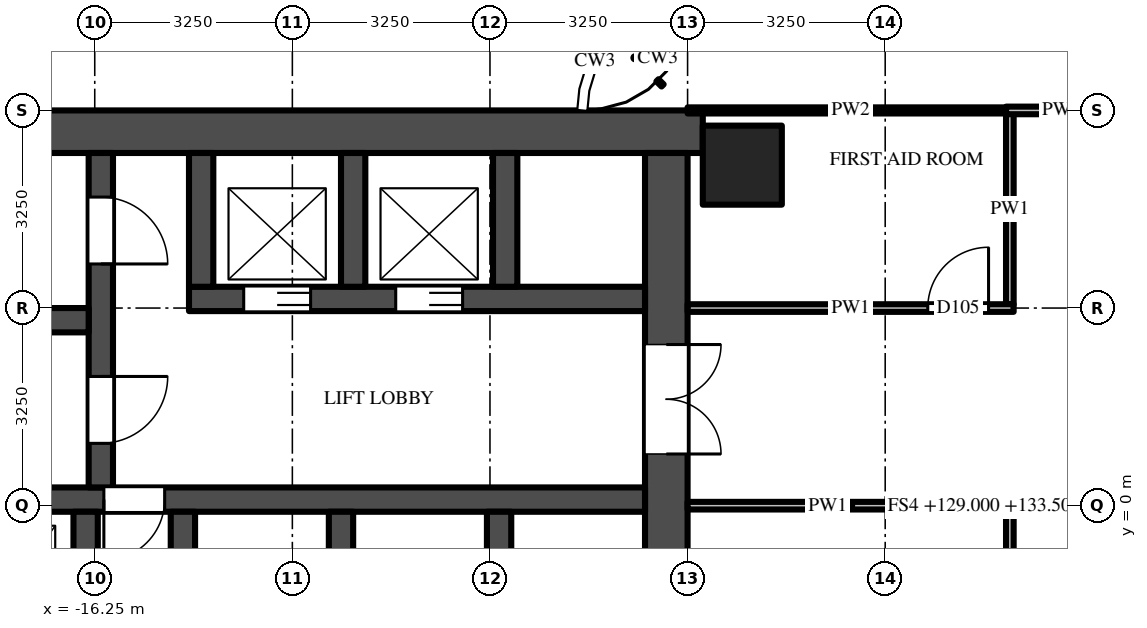
"""IFC4 building model, lengths in metres.
Left out: names, types, materials, properties, quantities, classifications, styles, units other than length and angle.
Written with IfcOpenShell. Run it as: python <this file> out.ifc"""

import sys

from ifc_helpers import new_model, si_unit, direction, frame, frame_2d, origin, origin_2d, place, context, subcontext, project, spatial, rectangle, extrude, source, transform, mapped, element, fill, save


model = new_model("IFC4")
c1 = context("Model", 3, precision=1e-05, world=origin(), true_north=direction((0.0, 1.0)))
c2 = subcontext(c1, "Body", "Model", "MODEL_VIEW")
j1 = project(units=[si_unit("LENGTHUNIT", "METRE"), si_unit("PLANEANGLEUNIT", "RADIAN")], contexts=[c1])
p1 = place(None, origin())
s1 = spatial("IfcSite", under=j1, at=p1, CompositionType="ELEMENT")
p2 = place(p1, origin())
s2 = spatial("IfcBuilding", under=s1, at=p2, CompositionType="ELEMENT")
p3 = place(p2, frame((0.0, 0.0, 129.0)))
s3 = spatial("IfcBuildingStorey", under=s2, at=p3, CompositionType="ELEMENT", Elevation=129.0)
m1 = source(origin(), c2, "Body", "SweptSolid", [
    extrude(rectangle(XDim=1.3, YDim=1.3, at=origin_2d()), origin(), (0.0, 0.0, 1.0), 4.5),
])
p4 = place(p3, frame((-5.6, 5.6, 0.0), z_axis=(0.0, 0.0, 1.0), x_axis=(1.0, 0.0, 0.0)))
e1 = element("IfcColumn", 1, at=p4, inside=s3, PredefinedType="COLUMN", context=c2, shape_type="MappedRepresentation", body=[
    mapped(m1, transform((0.0, 0.0, 0.0))),
])
m2 = source(origin(), c2, "Body", "SweptSolid", [
    extrude(rectangle(XDim=16.5, YDim=0.7, at=frame_2d((8.25, 0.0))), origin(), (0.0, 0.0, 1.0), 4.25),
])
p5 = place(p3, frame((-6.25, 6.15, 0.0), z_axis=(0.0, 0.0, 1.0), x_axis=(-1.0, 0.0, 0.0)))
e2 = element("IfcWall", 2, at=p5, inside=s3, PredefinedType="SHEAR", context=c2, shape_type="MappedRepresentation", body=[
    mapped(m2, transform((0.0, 0.0, 0.0))),
])
m3 = source(origin(), c2, "Body", "SweptSolid", [
    extrude(rectangle(XDim=9.05, YDim=0.7, at=frame_2d((4.525, 0.0))), origin(), (0.0, 0.0, 1.0), 4.25),
])
p6 = place(p3, frame((-6.85, 5.8, 0.0), z_axis=(0.0, 0.0, 1.0), x_axis=(0.0, -1.0, 0.0)))
e3 = element("IfcWall", 3, at=p6, inside=s3, PredefinedType="SHEAR", context=c2, shape_type="MappedRepresentation", body=[
    mapped(m3, transform((0.0, 0.0, 0.0))),
])
m4 = source(origin(), c2, "Body", "SweptSolid", [
    extrude(rectangle(XDim=1.8, YDim=2.1, at=frame_2d((0.9, 1.05))), frame((0.0, 0.36, 0.0), z_axis=(0.0, -1.0, 0.0), x_axis=(1.0, 0.0, 0.0)), (0.0, 0.0, 1.0), 0.72),
])
p7 = place(p6, frame((3.15, 0.0, 0.0)))
e4 = element("IfcOpeningElement", 4, at=p7, cuts=e3, PredefinedType="OPENING", context=c2, shape_type="MappedRepresentation", body=[
    mapped(m4, transform((0.0, 0.0, 0.0))),
])
m5 = source(origin(), c2, "Body", "SweptSolid", [
    extrude(rectangle(XDim=7.5, YDim=0.4, at=frame_2d((3.75, 0.0))), origin(), (0.0, 0.0, 1.0), 4.25),
])
p8 = place(p3, frame((-7.2, 3.4, 0.0), z_axis=(0.0, 0.0, 1.0), x_axis=(-1.0, 0.0, 0.0)))
e5 = element("IfcWall", 5, at=p8, inside=s3, PredefinedType="SHEAR", context=c2, shape_type="MappedRepresentation", body=[
    mapped(m5, transform((0.0, 0.0, 0.0))),
])
m6 = source(origin(), c2, "Body", "SweptSolid", [
    extrude(rectangle(XDim=1.1, YDim=2.1, at=frame_2d((0.55, 1.05))), frame((0.0, 0.21, 0.0), z_axis=(0.0, -1.0, 0.0), x_axis=(1.0, 0.0, 0.0)), (0.0, 0.0, 1.0), 0.42),
])
p9 = place(p8, frame((3.0, 0.0, 0.0)))
e6 = element("IfcOpeningElement", 6, at=p9, cuts=e5, PredefinedType="OPENING", context=c2, shape_type="MappedRepresentation", body=[
    mapped(m6, transform((0.0, 0.0, 0.0))),
])
p10 = place(p8, frame((5.5, 0.0, 0.0)))
e7 = element("IfcOpeningElement", 7, at=p10, cuts=e5, PredefinedType="OPENING", context=c2, shape_type="MappedRepresentation", body=[
    mapped(m6, transform((0.0, 0.0, 0.0))),
])
m7 = source(origin(), c2, "Body", "SweptSolid", [
    extrude(rectangle(XDim=14.85, YDim=0.4, at=frame_2d((7.425, 0.0))), origin(), (0.0, 0.0, 1.0), 4.25),
])
p11 = place(p3, frame((-7.2, 0.1, 0.0), z_axis=(0.0, 0.0, 1.0), x_axis=(-1.0, 0.0, 0.0)))
e8 = element("IfcWall", 8, at=p11, inside=s3, PredefinedType="SHEAR", context=c2, shape_type="MappedRepresentation", body=[
    mapped(m7, transform((0.0, 0.0, 0.0))),
])
m8 = source(origin(), c2, "Body", "SweptSolid", [
    extrude(rectangle(XDim=1.0, YDim=2.1, at=frame_2d((0.5, 1.05))), frame((0.0, 0.21, 0.0), z_axis=(0.0, -1.0, 0.0), x_axis=(1.0, 0.0, 0.0)), (0.0, 0.0, 1.0), 0.42),
])
p12 = place(p11, frame((7.9, 0.0, 0.0)))
e9 = element("IfcOpeningElement", 9, at=p12, cuts=e8, PredefinedType="OPENING", context=c2, shape_type="MappedRepresentation", body=[
    mapped(m8, transform((0.0, 0.0, 0.0))),
])
m9 = source(origin(), c2, "Body", "SweptSolid", [
    extrude(rectangle(XDim=5.5, YDim=0.4, at=frame_2d((2.75, 0.0))), origin(), (0.0, 0.0, 1.0), 4.25),
])
p13 = place(p3, frame((-16.15, 5.8, 0.0), z_axis=(0.0, 0.0, 1.0), x_axis=(0.0, -1.0, 0.0)))
e10 = element("IfcWall", 10, at=p13, inside=s3, PredefinedType="SHEAR", context=c2, shape_type="MappedRepresentation", body=[
    mapped(m9, transform((0.0, 0.0, 0.0))),
])
p14 = place(p13, frame((0.725, 0.0, 0.0)))
e11 = element("IfcOpeningElement", 11, at=p14, cuts=e10, PredefinedType="OPENING", context=c2, shape_type="MappedRepresentation", body=[
    mapped(m6, transform((0.0, 0.0, 0.0))),
])
p15 = place(p13, frame((3.675, 0.0, 0.0)))
e12 = element("IfcOpeningElement", 12, at=p15, cuts=e10, PredefinedType="OPENING", context=c2, shape_type="MappedRepresentation", body=[
    mapped(m6, transform((0.0, 0.0, 0.0))),
])
m10 = source(origin(), c2, "Body", "SweptSolid", [
    extrude(rectangle(XDim=5.7, YDim=0.4, at=frame_2d((2.85, 0.0))), origin(), (0.0, 0.0, 1.0), 4.25),
])
p16 = place(p3, frame((-16.35, 3.05, 0.0), z_axis=(0.0, 0.0, 1.0), x_axis=(-1.0, 0.0, 0.0)))
e13 = element("IfcWall", 13, at=p16, inside=s3, PredefinedType="SHEAR", context=c2, shape_type="MappedRepresentation", body=[
    mapped(m10, transform((0.0, 0.0, 0.0))),
])
m11 = source(origin(), c2, "Body", "SweptSolid", [
    extrude(rectangle(XDim=2.2, YDim=0.4, at=frame_2d((1.1, 0.0))), origin(), (0.0, 0.0, 1.0), 4.25),
])
for number, where, z_axis, x_axis in (
    (14, (-9.5, 5.8, 0.0), (0.0, 0.0, 1.0), (0.0, -1.0, 0.0)),
    (15, (-12.0, 5.8, 0.0), (0.0, 0.0, 1.0), (0.0, -1.0, 0.0)),
    (16, (-14.5, 5.8, 0.0), (0.0, 0.0, 1.0), (0.0, -1.0, 0.0)),
):
    element("IfcWall", number, at=place(p3, frame(where, z_axis=z_axis, x_axis=x_axis)), inside=s3, PredefinedType="SHEAR", context=c2, shape_type="MappedRepresentation", body=[
        mapped(m11, transform((0.0, 0.0, 0.0))),
    ])
m12 = source(origin(), c2, "Body", "SweptSolid", [
    extrude(rectangle(XDim=2.45, YDim=0.4, at=frame_2d((1.225, 0.0))), origin(), (0.0, 0.0, 1.0), 4.25),
])
for number, where, z_axis, x_axis in (
    (17, (-9.6, -0.1, 0.0), (0.0, 0.0, 1.0), (0.0, -1.0, 0.0)),
    (18, (-12.2, -0.1, 0.0), (0.0, 0.0, 1.0), (0.0, -1.0, 0.0)),
    (19, (-14.8, -0.1, 0.0), (0.0, 0.0, 1.0), (0.0, -1.0, 0.0)),
    (20, (-16.4, -0.1, 0.0), (0.0, 0.0, 1.0), (0.0, -1.0, 0.0)),
):
    element("IfcWall", number, at=place(p3, frame(where, z_axis=z_axis, x_axis=x_axis)), inside=s3, PredefinedType="SHEAR", context=c2, shape_type="MappedRepresentation", body=[
        mapped(m12, transform((0.0, 0.0, 0.0))),
    ])
m13 = source(origin(), c2, "Body", "SweptSolid", [
    extrude(rectangle(XDim=3.125, YDim=0.125, at=frame_2d((1.562, 0.0))), origin(), (0.0, 0.0, 1.0), 3.546),
])
p17 = place(p3, frame((-1.2, -0.062, 0.0), z_axis=(0.0, 0.0, 1.0), x_axis=(0.0, -1.0, 0.0)))
e21 = element("IfcWall", 21, at=p17, inside=s3, PredefinedType="PARTITIONING", context=c2, shape_type="MappedRepresentation", body=[
    mapped(m13, transform((0.0, 0.0, 0.0))),
])
m14 = source(origin(), c2, "Body", "SweptSolid", [
    extrude(rectangle(XDim=3.137, YDim=0.125, at=frame_2d((1.569, 0.0))), origin(), (0.0, 0.0, 1.0), 3.468),
])
p18 = place(p3, frame((-1.2, 6.45, 0.0), z_axis=(0.0, 0.0, 1.0), x_axis=(0.0, -1.0, 0.0)))
e22 = element("IfcWall", 22, at=p18, inside=s3, PredefinedType="PARTITIONING", context=c2, shape_type="MappedRepresentation", body=[
    mapped(m14, transform((0.0, 0.0, 0.0))),
])
m15 = source(origin(), c2, "Body", "SweptSolid", [
    extrude(rectangle(XDim=5.363, YDim=0.125, at=frame_2d((2.681, 0.0))), origin(), (0.0, 0.0, 1.0), 3.468),
])
p19 = place(p3, frame((-1.137, 0.0, 0.0), z_axis=(0.0, 0.0, 1.0), x_axis=(-1.0, 0.0, 0.0)))
e23 = element("IfcWall", 23, at=p19, inside=s3, PredefinedType="PARTITIONING", context=c2, shape_type="MappedRepresentation", body=[
    mapped(m15, transform((0.0, 0.0, 0.0))),
])
p20 = place(p3, frame((-6.5, 3.25, 0.0), z_axis=(0.0, 0.0, 1.0), x_axis=(1.0, 0.0, 0.0)))
e24 = element("IfcWall", 24, at=p20, inside=s3, PredefinedType="PARTITIONING", context=c2, shape_type="MappedRepresentation", body=[
    mapped(m15, transform((0.0, 0.0, 0.0))),
])
m16 = source(origin(), c2, "Body", "SweptSolid", [
    extrude(rectangle(XDim=1.0, YDim=2.1, at=frame_2d((0.5, 1.05))), frame((0.0, 0.073, 0.0), z_axis=(0.0, -1.0, 0.0), x_axis=(1.0, 0.0, 0.0)), (0.0, 0.0, 1.0), 0.145),
])
p21 = place(p20, frame((3.95, 0.0, 0.0)))
e25 = element("IfcOpeningElement", 25, at=p21, cuts=e24, PredefinedType="OPENING", context=c2, shape_type="MappedRepresentation", body=[
    mapped(m16, transform((0.0, 0.0, 0.0))),
])
m17 = source(origin(), c2, "Body", "SweptSolid", [
    extrude(rectangle(XDim=5.363, YDim=0.1, at=frame_2d((2.681, 0.0))), origin(), (0.0, 0.0, 1.0), 3.33),
])
p22 = place(p3, frame((-6.5, 6.5, 0.0), z_axis=(0.0, 0.0, 1.0), x_axis=(1.0, 0.0, 0.0)))
e26 = element("IfcWall", 26, at=p22, inside=s3, PredefinedType="PARTITIONING", context=c2, shape_type="MappedRepresentation", body=[
    mapped(m17, transform((0.0, 0.0, 0.0))),
])
m18 = source(origin(), c2, "Body", "SweptSolid", [
    extrude(rectangle(XDim=1.825, YDim=0.125, at=frame_2d((0.913, 0.0))), origin(), (0.0, 0.0, 1.0), 4.25),
])
p23 = place(p3, frame((-1.262, 6.5, 0.0), z_axis=(0.0, 0.0, 1.0), x_axis=(1.0, 0.0, 0.0)))
e27 = element("IfcWall", 27, at=p23, inside=s3, PredefinedType="PARTITIONING", context=c2, shape_type="MappedRepresentation", body=[
    mapped(m18, transform((0.0, 0.0, 0.0))),
])
m19 = source(origin(), c2, "Body", "SweptSolid", [
    extrude(rectangle(XDim=1.1, YDim=2.1, at=frame_2d((0.55, 1.05))), frame((0.0, 0.025, 0.0), z_axis=(0.0, -1.0, 0.0), x_axis=(1.0, 0.0, 0.0)), (0.0, 0.0, 1.0), 0.05),
])
p24 = place(p9, origin())
e28 = element("IfcDoor", 28, at=p24, inside=s3, OperationType="DOUBLE_DOOR_SLIDING", PredefinedType="DOOR", context=c2, shape_type="MappedRepresentation", body=[
    mapped(m19, transform((0.0, 0.0, 0.0))),
])
fill(e6, e28)
p25 = place(p10, origin())
e29 = element("IfcDoor", 29, at=p25, inside=s3, OperationType="DOUBLE_DOOR_SLIDING", PredefinedType="DOOR", context=c2, shape_type="MappedRepresentation", body=[
    mapped(m19, transform((0.0, 0.0, 0.0))),
])
fill(e7, e29)
m20 = source(origin(), c2, "Body", "SweptSolid", [
    extrude(rectangle(XDim=1.8, YDim=2.1, at=frame_2d((0.9, 1.05))), frame((0.0, -0.275, 0.0), z_axis=(0.0, -1.0, 0.0), x_axis=(1.0, 0.0, 0.0)), (0.0, 0.0, 1.0), 0.05),
])
p26 = place(p7, origin())
e30 = element("IfcDoor", 30, at=p26, inside=s3, OperationType="DOUBLE_DOOR_SINGLE_SWING", PredefinedType="DOOR", context=c2, shape_type="MappedRepresentation", body=[
    mapped(m20, transform((0.0, 0.0, 0.0))),
])
fill(e4, e30)
p27 = place(p14, origin())
e31 = element("IfcDoor", 31, at=p27, inside=s3, OperationType="SINGLE_SWING_RIGHT", PredefinedType="DOOR", context=c2, shape_type="MappedRepresentation", body=[
    mapped(m19, transform((0.0, 0.0, 0.0))),
])
fill(e11, e31)
p28 = place(p15, origin())
e32 = element("IfcDoor", 32, at=p28, inside=s3, OperationType="SINGLE_SWING_LEFT", PredefinedType="DOOR", context=c2, shape_type="MappedRepresentation", body=[
    mapped(m19, transform((0.0, 0.0, 0.0))),
])
fill(e12, e32)
m21 = source(origin(), c2, "Body", "SweptSolid", [
    extrude(rectangle(XDim=1.0, YDim=2.1, at=frame_2d((0.5, 1.05))), frame((0.0, 0.025, 0.0), z_axis=(0.0, -1.0, 0.0), x_axis=(1.0, 0.0, 0.0)), (0.0, 0.0, 1.0), 0.05),
])
p29 = place(p12, origin())
e33 = element("IfcDoor", 33, at=p29, inside=s3, OperationType="SINGLE_SWING_RIGHT", PredefinedType="DOOR", context=c2, shape_type="MappedRepresentation", body=[
    mapped(m21, transform((0.0, 0.0, 0.0))),
])
fill(e9, e33)
p30 = place(p21, origin())
e34 = element("IfcDoor", 34, at=p30, inside=s3, OperationType="SINGLE_SWING_RIGHT", PredefinedType="DOOR", context=c2, shape_type="MappedRepresentation", body=[
    mapped(m21, transform((0.0, 0.0, 0.0))),
])
fill(e25, e34)
save(model, sys.argv[1])
